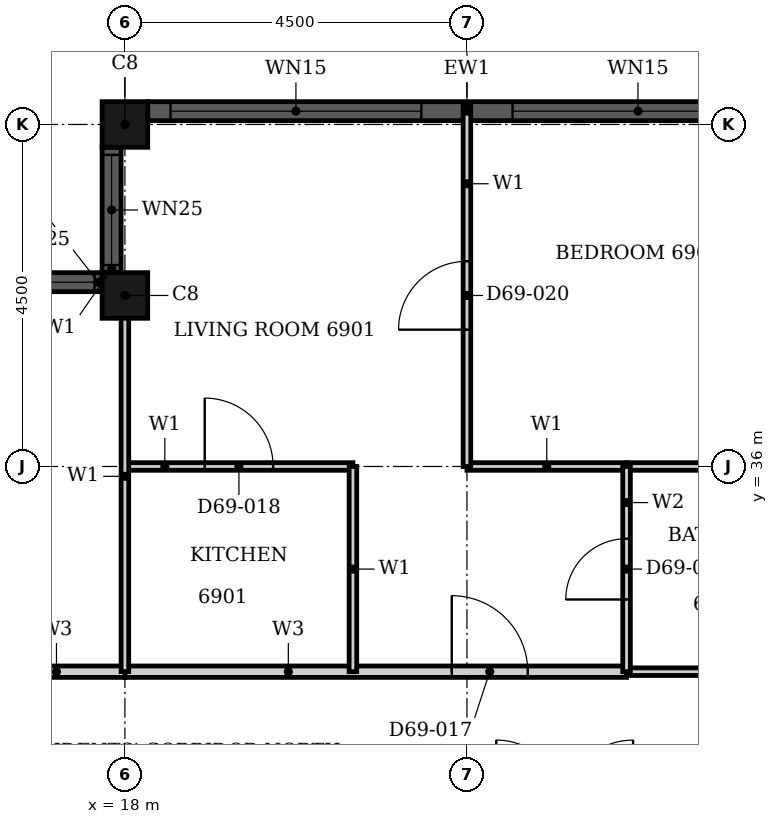
"""IFC4 building model, lengths in metres.
Left out: names, types, materials, properties, quantities, classifications, styles, units other than length and angle.
Written with IfcOpenShell. Run it as: python <this file> out.ifc"""

import sys

from ifc_helpers import new_model, si_unit, direction, frame, frame_2d, origin, origin_2d, place, context, subcontext, project, spatial, rectangle, hollow_rectangle, extrude, element, fill, save


model = new_model("IFC4")
c1 = context("Model", 3, precision=1e-05, world=origin(), true_north=direction((0.0, 1.0)))
c2 = subcontext(c1, "Body", "Model", "MODEL_VIEW")
j1 = project(units=[si_unit("LENGTHUNIT", "METRE"), si_unit("PLANEANGLEUNIT", "RADIAN")], contexts=[c1])
p1 = place(None, origin())
s1 = spatial("IfcSite", under=j1, at=p1, CompositionType="ELEMENT")
p2 = place(p1, origin())
s2 = spatial("IfcBuilding", under=s1, at=p2, CompositionType="ELEMENT")
p3 = place(p2, frame((0.0, 0.0, 271.2)))
s3 = spatial("IfcBuildingStorey", under=s2, at=p3, CompositionType="ELEMENT", Elevation=271.2)
for number, where, z_axis, x_axis in (
    (1, (18.0, 40.5, 0.0), (0.0, 0.0, 1.0), (1.0, 0.0, 0.0)),
    (2, (18.0, 38.25, 0.0), (0.0, 0.0, 1.0), (1.0, 0.0, 0.0)),
):
    element("IfcColumn", number, at=place(p3, frame(where, z_axis=z_axis, x_axis=x_axis)), inside=s3, PredefinedType="COLUMN", context=c2, shape_type="SweptSolid", body=[
        extrude(hollow_rectangle(XDim=0.6, YDim=0.6, WallThickness=0.02, at=origin_2d()), origin(), (0.0, 0.0, 1.0), 3.7),
    ])
p4 = place(p3, frame((26.7, 40.675, 0.0), z_axis=(0.0, 0.0, 1.0), x_axis=(-1.0, 0.0, 0.0)))
e3 = element("IfcWall", 3, at=p4, inside=s3, PredefinedType="SOLIDWALL", context=c2, shape_type="SweptSolid", body=[
    extrude(rectangle(XDim=8.4, YDim=0.25, at=frame_2d((4.2, 0.0))), origin(), (0.0, 0.0, 1.0), 3.7),
])
p5 = place(p4, frame((0.3, 0.0, 0.45)))
e4 = element("IfcOpeningElement", 4, at=p5, cuts=e3, PredefinedType="OPENING", context=c2, shape_type="SweptSolid", body=[
    extrude(rectangle(XDim=3.3, YDim=2.3, at=frame_2d((1.65, 1.15))), frame((0.0, 0.135, 0.0), z_axis=(0.0, -1.0, 0.0), x_axis=(1.0, 0.0, 0.0)), (0.0, 0.0, 1.0), 0.27),
])
p6 = place(p4, frame((4.8, 0.0, 0.45)))
e5 = element("IfcOpeningElement", 5, at=p6, cuts=e3, PredefinedType="OPENING", context=c2, shape_type="SweptSolid", body=[
    extrude(rectangle(XDim=3.3, YDim=2.3, at=frame_2d((1.65, 1.15))), frame((0.0, 0.135, 0.0), z_axis=(0.0, -1.0, 0.0), x_axis=(1.0, 0.0, 0.0)), (0.0, 0.0, 1.0), 0.27),
])
p7 = place(p3, frame((17.825, 40.2, 0.0), z_axis=(0.0, 0.0, 1.0), x_axis=(0.0, -1.0, 0.0)))
e6 = element("IfcWall", 6, at=p7, inside=s3, PredefinedType="SOLIDWALL", context=c2, shape_type="SweptSolid", body=[
    extrude(rectangle(XDim=1.65, YDim=0.25, at=frame_2d((0.825, 0.0))), origin(), (0.0, 0.0, 1.0), 3.7),
])
p8 = place(p7, frame((0.1, 0.0, 0.9)))
e7 = element("IfcOpeningElement", 7, at=p8, cuts=e6, PredefinedType="OPENING", context=c2, shape_type="SweptSolid", body=[
    extrude(rectangle(XDim=1.45, YDim=1.85, at=frame_2d((0.725, 0.925))), frame((0.0, 0.135, 0.0), z_axis=(0.0, -1.0, 0.0), x_axis=(1.0, 0.0, 0.0)), (0.0, 0.0, 1.0), 0.27),
])
p9 = place(p3, frame((17.7, 38.425, 0.0), z_axis=(0.0, 0.0, 1.0), x_axis=(-1.0, 0.0, 0.0)))
e8 = element("IfcWall", 8, at=p9, inside=s3, PredefinedType="SOLIDWALL", context=c2, shape_type="SweptSolid", body=[
    extrude(rectangle(XDim=1.65, YDim=0.25, at=frame_2d((0.825, 0.0))), origin(), (0.0, 0.0, 1.0), 3.7),
])
p10 = place(p9, frame((0.1, 0.0, 0.9)))
e9 = element("IfcOpeningElement", 9, at=p10, cuts=e8, PredefinedType="OPENING", context=c2, shape_type="SweptSolid", body=[
    extrude(rectangle(XDim=1.45, YDim=1.85, at=frame_2d((0.725, 0.925))), frame((0.0, 0.135, 0.0), z_axis=(0.0, -1.0, 0.0), x_axis=(1.0, 0.0, 0.0)), (0.0, 0.0, 1.0), 0.27),
])
p11 = place(p3, frame((18.0, 33.3, 0.0), z_axis=(0.0, 0.0, 1.0), x_axis=(1.0, 0.0, 0.0)))
e10 = element("IfcWall", 10, at=p11, inside=s3, PredefinedType="PARTITIONING", context=c2, shape_type="SweptSolid", body=[
    extrude(rectangle(XDim=6.6, YDim=0.15, at=frame_2d((3.3, 0.0))), origin(), (0.0, 0.0, 1.0), 3.4),
])
p12 = place(p11, frame((4.3, 0.0, 0.0)))
e11 = element("IfcOpeningElement", 11, at=p12, cuts=e10, PredefinedType="OPENING", context=c2, shape_type="SweptSolid", body=[
    extrude(rectangle(XDim=1.0, YDim=2.2, at=frame_2d((0.5, 1.1))), frame((0.0, 0.085, 0.0), z_axis=(0.0, -1.0, 0.0), x_axis=(1.0, 0.0, 0.0)), (0.0, 0.0, 1.0), 0.17),
])
p13 = place(p3, frame((16.2, 33.3, 0.0), z_axis=(0.0, 0.0, 1.0), x_axis=(1.0, 0.0, 0.0)))
e12 = element("IfcWall", 12, at=p13, inside=s3, PredefinedType="PARTITIONING", context=c2, shape_type="SweptSolid", body=[
    extrude(rectangle(XDim=1.799, YDim=0.15, at=frame_2d((0.899, 0.0))), origin(), (0.0, 0.0, 1.0), 3.4),
])
p14 = place(p3, frame((22.5, 36.0, 0.0), z_axis=(0.0, 0.0, 1.0), x_axis=(1.0, 0.0, 0.0)))
e13 = element("IfcWall", 13, at=p14, inside=s3, PredefinedType="PARTITIONING", context=c2, shape_type="SweptSolid", body=[
    extrude(rectangle(XDim=2.1, YDim=0.1, at=frame_2d((1.05, 0.0))), origin(), (0.0, 0.0, 1.0), 3.4),
])
p15 = place(p3, frame((18.0, 36.0, 0.0), z_axis=(0.0, 0.0, 1.0), x_axis=(1.0, 0.0, 0.0)))
e14 = element("IfcWall", 14, at=p15, inside=s3, PredefinedType="PARTITIONING", context=c2, shape_type="SweptSolid", body=[
    extrude(rectangle(XDim=3.0, YDim=0.1, at=frame_2d((1.5, 0.0))), origin(), (0.0, 0.0, 1.0), 3.4),
])
p16 = place(p15, frame((1.05, 0.0, 0.0)))
e15 = element("IfcOpeningElement", 15, at=p16, cuts=e14, PredefinedType="OPENING", context=c2, shape_type="SweptSolid", body=[
    extrude(rectangle(XDim=0.9, YDim=2.1, at=frame_2d((0.45, 1.05))), frame((0.0, 0.06, 0.0), z_axis=(0.0, -1.0, 0.0), x_axis=(1.0, 0.0, 0.0)), (0.0, 0.0, 1.0), 0.12),
])
p17 = place(p3, frame((18.0, 33.301, 0.0), z_axis=(0.0, 0.0, 1.0), x_axis=(0.0, 1.0, 0.0)))
e16 = element("IfcWall", 16, at=p17, inside=s3, PredefinedType="PARTITIONING", context=c2, shape_type="SweptSolid", body=[
    extrude(rectangle(XDim=5.139, YDim=0.1, at=frame_2d((2.569, 0.0))), origin(), (0.0, 0.0, 1.0), 3.4),
])
p18 = place(p3, frame((21.0, 33.3, 0.0), z_axis=(0.0, 0.0, 1.0), x_axis=(0.0, 1.0, 0.0)))
e17 = element("IfcWall", 17, at=p18, inside=s3, PredefinedType="PARTITIONING", context=c2, shape_type="SweptSolid", body=[
    extrude(rectangle(XDim=2.7, YDim=0.1, at=frame_2d((1.35, 0.0))), origin(), (0.0, 0.0, 1.0), 3.4),
])
p19 = place(p3, frame((22.5, 36.0, 0.0), z_axis=(0.0, 0.0, 1.0), x_axis=(0.0, 1.0, 0.0)))
e18 = element("IfcWall", 18, at=p19, inside=s3, PredefinedType="PARTITIONING", context=c2, shape_type="SweptSolid", body=[
    extrude(rectangle(XDim=4.74, YDim=0.1, at=frame_2d((2.37, 0.0))), origin(), (0.0, 0.0, 1.0), 3.4),
])
p20 = place(p19, frame((1.8, 0.0, 0.0)))
e19 = element("IfcOpeningElement", 19, at=p20, cuts=e18, PredefinedType="OPENING", context=c2, shape_type="SweptSolid", body=[
    extrude(rectangle(XDim=0.9, YDim=2.1, at=frame_2d((0.45, 1.05))), frame((0.0, 0.06, 0.0), z_axis=(0.0, -1.0, 0.0), x_axis=(1.0, 0.0, 0.0)), (0.0, 0.0, 1.0), 0.12),
])
for number, where, z_axis, x_axis in (
    (20, (24.6, 33.3, 0.0), (0.0, 0.0, 1.0), (1.0, 0.0, 0.0)),
    (21, (24.6, 36.0, 0.0), (0.0, 0.0, 1.0), (1.0, 0.0, 0.0)),
):
    element("IfcWall", number, at=place(p3, frame(where, z_axis=z_axis, x_axis=x_axis)), inside=s3, PredefinedType="PARTITIONING", context=c2, shape_type="SweptSolid", body=[
        extrude(rectangle(XDim=4.8, YDim=0.1, at=frame_2d((2.4, 0.0))), origin(), (0.0, 0.0, 1.0), 3.4),
    ])
p21 = place(p3, frame((24.6, 33.3, 0.0), z_axis=(0.0, 0.0, 1.0), x_axis=(0.0, 1.0, 0.0)))
e22 = element("IfcWall", 22, at=p21, inside=s3, PredefinedType="PARTITIONING", context=c2, shape_type="SweptSolid", body=[
    extrude(rectangle(XDim=2.7, YDim=0.1, at=frame_2d((1.35, 0.0))), origin(), (0.0, 0.0, 1.0), 3.4),
])
p22 = place(p21, frame((0.95, 0.0, 0.0)))
e23 = element("IfcOpeningElement", 23, at=p22, cuts=e22, PredefinedType="OPENING", context=c2, shape_type="SweptSolid", body=[
    extrude(rectangle(XDim=0.8, YDim=2.1, at=frame_2d((0.4, 1.05))), frame((0.0, 0.06, 0.0), z_axis=(0.0, -1.0, 0.0), x_axis=(1.0, 0.0, 0.0)), (0.0, 0.0, 1.0), 0.12),
])
p23 = place(p5, origin())
e24 = element("IfcWindow", 24, at=p23, inside=s3, PartitioningType="SINGLE_PANEL", PredefinedType="WINDOW", context=c2, shape_type="SweptSolid", body=[
    extrude(rectangle(XDim=3.3, YDim=2.3, at=frame_2d((1.65, 1.15))), frame((0.0, 0.03, 0.0), z_axis=(0.0, -1.0, 0.0), x_axis=(1.0, 0.0, 0.0)), (0.0, 0.0, 1.0), 0.06),
])
fill(e4, e24)
p24 = place(p6, origin())
e25 = element("IfcWindow", 25, at=p24, inside=s3, PartitioningType="SINGLE_PANEL", PredefinedType="WINDOW", context=c2, shape_type="SweptSolid", body=[
    extrude(rectangle(XDim=3.3, YDim=2.3, at=frame_2d((1.65, 1.15))), frame((0.0, 0.03, 0.0), z_axis=(0.0, -1.0, 0.0), x_axis=(1.0, 0.0, 0.0)), (0.0, 0.0, 1.0), 0.06),
])
fill(e5, e25)
p25 = place(p8, origin())
e26 = element("IfcWindow", 26, at=p25, inside=s3, PartitioningType="SINGLE_PANEL", PredefinedType="WINDOW", context=c2, shape_type="SweptSolid", body=[
    extrude(rectangle(XDim=1.45, YDim=1.85, at=frame_2d((0.725, 0.925))), frame((0.0, 0.03, 0.0), z_axis=(0.0, -1.0, 0.0), x_axis=(1.0, 0.0, 0.0)), (0.0, 0.0, 1.0), 0.06),
])
fill(e7, e26)
p26 = place(p10, origin())
e27 = element("IfcWindow", 27, at=p26, inside=s3, PartitioningType="SINGLE_PANEL", PredefinedType="WINDOW", context=c2, shape_type="SweptSolid", body=[
    extrude(rectangle(XDim=1.45, YDim=1.85, at=frame_2d((0.725, 0.925))), frame((0.0, 0.03, 0.0), z_axis=(0.0, -1.0, 0.0), x_axis=(1.0, 0.0, 0.0)), (0.0, 0.0, 1.0), 0.06),
])
fill(e9, e27)
p27 = place(p12, origin())
e28 = element("IfcDoor", 28, at=p27, inside=s3, OperationType="SINGLE_SWING_LEFT", PredefinedType="DOOR", context=c2, shape_type="SweptSolid", body=[
    extrude(rectangle(XDim=1.0, YDim=2.2, at=frame_2d((0.5, 1.1))), frame((0.0, 0.025, 0.0), z_axis=(0.0, -1.0, 0.0), x_axis=(1.0, 0.0, 0.0)), (0.0, 0.0, 1.0), 0.05),
])
fill(e11, e28)
p28 = place(p16, origin())
e29 = element("IfcDoor", 29, at=p28, inside=s3, OperationType="SINGLE_SWING_RIGHT", PredefinedType="DOOR", context=c2, shape_type="SweptSolid", body=[
    extrude(rectangle(XDim=0.9, YDim=2.1, at=frame_2d((0.45, 1.05))), frame((0.0, 0.025, 0.0), z_axis=(0.0, -1.0, 0.0), x_axis=(1.0, 0.0, 0.0)), (0.0, 0.0, 1.0), 0.05),
])
fill(e15, e29)
p29 = place(p22, origin())
e30 = element("IfcDoor", 30, at=p29, inside=s3, OperationType="SINGLE_SWING_LEFT", PredefinedType="DOOR", context=c2, shape_type="SweptSolid", body=[
    extrude(rectangle(XDim=0.8, YDim=2.1, at=frame_2d((0.4, 1.05))), frame((0.0, 0.025, 0.0), z_axis=(0.0, -1.0, 0.0), x_axis=(1.0, 0.0, 0.0)), (0.0, 0.0, 1.0), 0.05),
])
fill(e23, e30)
p30 = place(p20, origin())
e31 = element("IfcDoor", 31, at=p30, inside=s3, OperationType="SINGLE_SWING_RIGHT", PredefinedType="DOOR", context=c2, shape_type="SweptSolid", body=[
    extrude(rectangle(XDim=0.9, YDim=2.1, at=frame_2d((0.45, 1.05))), frame((0.0, 0.025, 0.0), z_axis=(0.0, -1.0, 0.0), x_axis=(1.0, 0.0, 0.0)), (0.0, 0.0, 1.0), 0.05),
])
fill(e19, e31)
save(model, sys.argv[1])
